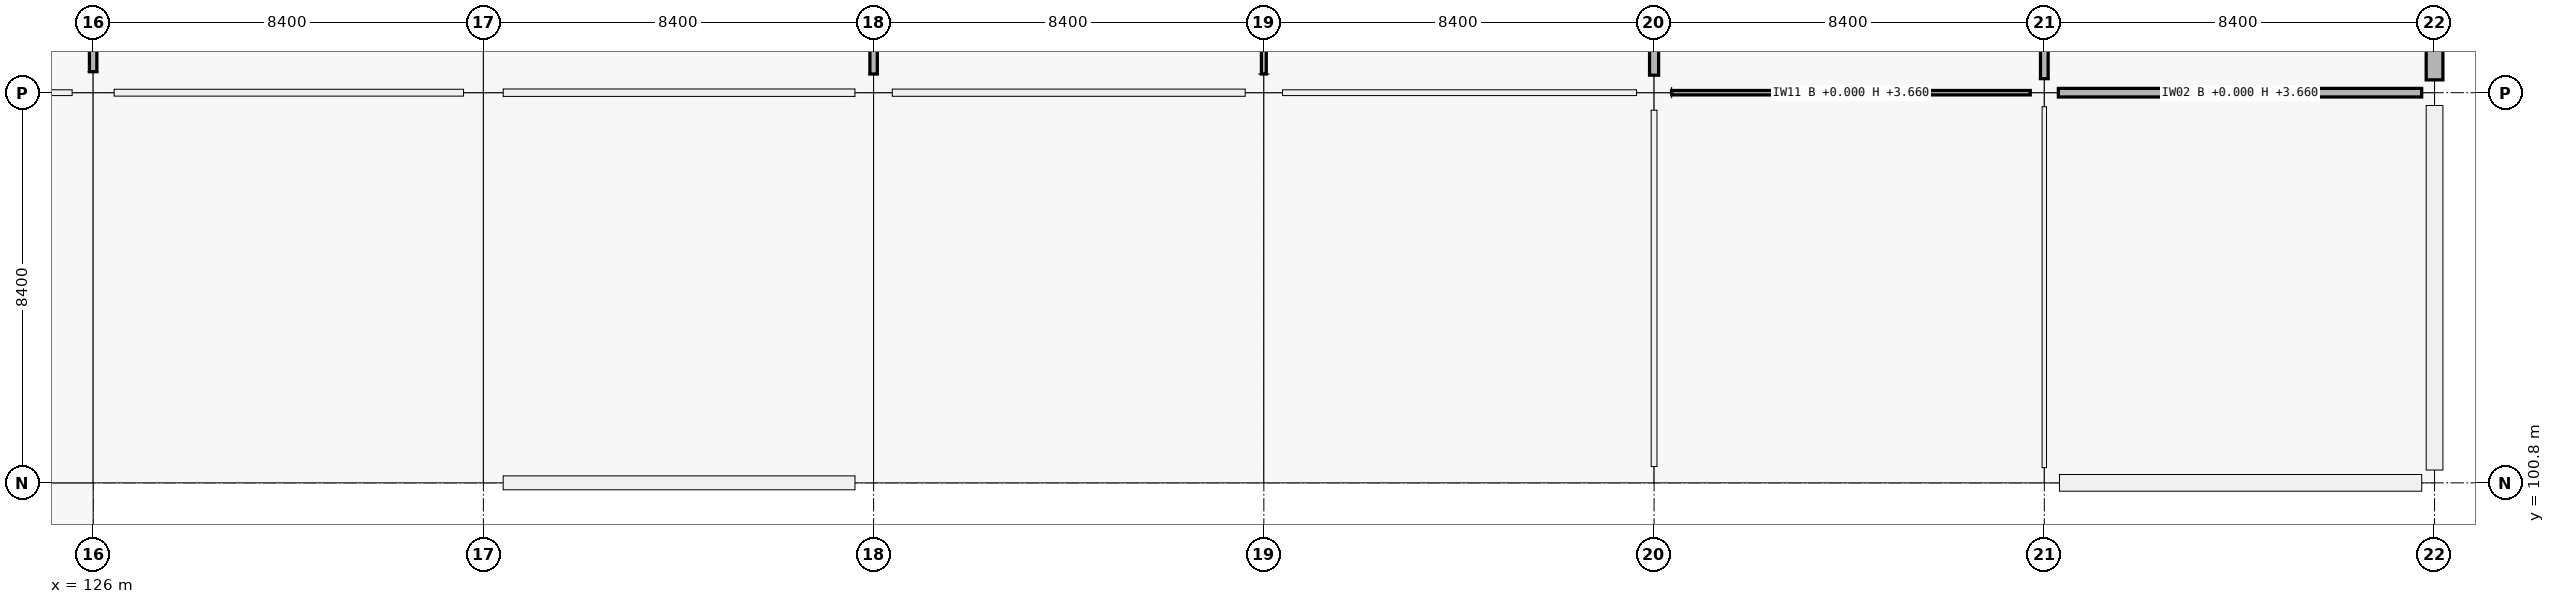
"""IFC4 building model, lengths in metres.
Left out: names, types, materials, properties, quantities, classifications, styles, units other than length and angle.
Written with IfcOpenShell. Run it as: python <this file> out.ifc"""

import sys

from ifc_helpers import new_model, si_unit, direction, frame, frame_2d, origin, origin_2d, place, context, subcontext, project, spatial, rectangle, extrude, element, fill, save


model = new_model("IFC4")
c1 = context("Model", 3, precision=1e-05, world=origin(), true_north=direction((0.0, 1.0)))
c2 = subcontext(c1, "Body", "Model", "MODEL_VIEW")
j1 = project(units=[si_unit("LENGTHUNIT", "METRE"), si_unit("PLANEANGLEUNIT", "RADIAN")], contexts=[c1])
p1 = place(None, origin())
s1 = spatial("IfcSite", under=j1, at=p1, CompositionType="ELEMENT")
p2 = place(p1, origin())
s2 = spatial("IfcBuilding", under=s1, at=p2, CompositionType="ELEMENT")
p3 = place(p2, origin())
s3 = spatial("IfcBuildingStorey", under=s2, at=p3, CompositionType="ELEMENT", Elevation=0.0)
for number, where, z_axis, x_axis in (
    (1, (126.0, 100.8, 0.0), (0.0, 0.0, 1.0), (1.0, 0.0, 0.0)),
    (2, (126.0, 109.2, 0.0), (0.0, 0.0, 1.0), (1.0, 0.0, 0.0)),
):
    element("IfcColumn", number, at=place(p3, frame(where, z_axis=z_axis, x_axis=x_axis)), inside=s3, PredefinedType="COLUMN", context=c2, shape_type="SweptSolid", body=[
        extrude(rectangle(XDim=0.9, YDim=0.9, at=origin_2d()), origin(), (0.0, 0.0, 1.0), 5.76),
    ])
for number, where, z_axis, x_axis in (
    (3, (134.4, 100.8, 0.0), (0.0, 0.0, 1.0), (1.0, 0.0, 0.0)),
    (4, (134.4, 109.2, 0.0), (0.0, 0.0, 1.0), (1.0, 0.0, 0.0)),
):
    element("IfcColumn", number, at=place(p3, frame(where, z_axis=z_axis, x_axis=x_axis)), inside=s3, PredefinedType="COLUMN", context=c2, shape_type="SweptSolid", body=[
        extrude(rectangle(XDim=0.85, YDim=0.85, at=origin_2d()), origin(), (0.0, 0.0, 1.0), 5.76),
    ])
for number, where, z_axis, x_axis in (
    (5, (142.8, 100.8, 0.0), (0.0, 0.0, 1.0), (1.0, 0.0, 0.0)),
    (6, (142.8, 109.2, 0.0), (0.0, 0.0, 1.0), (1.0, 0.0, 0.0)),
    (7, (151.2, 100.8, 0.0), (0.0, 0.0, 1.0), (1.0, 0.0, 0.0)),
    (8, (151.2, 109.2, 0.0), (0.0, 0.0, 1.0), (1.0, 0.0, 0.0)),
):
    element("IfcColumn", number, at=place(p3, frame(where, z_axis=z_axis, x_axis=x_axis)), inside=s3, PredefinedType="COLUMN", context=c2, shape_type="SweptSolid", body=[
        extrude(rectangle(XDim=0.8, YDim=0.8, at=origin_2d()), origin(), (0.0, 0.0, 1.0), 5.76),
    ])
p4 = place(p3, frame((159.6, 100.8, 0.0), z_axis=(0.0, 0.0, 1.0), x_axis=(1.0, 0.0, 0.0)))
e9 = element("IfcColumn", 9, at=p4, inside=s3, PredefinedType="COLUMN", context=c2, shape_type="SweptSolid", body=[
    extrude(rectangle(XDim=0.7, YDim=0.7, at=origin_2d()), origin(), (0.0, 0.0, 1.0), 5.76),
])
p5 = place(p3, frame((159.6, 109.2, 0.0), z_axis=(0.0, 0.0, 1.0), x_axis=(1.0, 0.0, 0.0)))
e10 = element("IfcColumn", 10, at=p5, inside=s3, PredefinedType="COLUMN", context=c2, shape_type="SweptSolid", body=[
    extrude(rectangle(XDim=0.75, YDim=0.75, at=origin_2d()), origin(), (0.0, 0.0, 1.0), 5.76),
])
p6 = place(p3, frame((168.0, 100.8, 0.0), z_axis=(0.0, 0.0, 1.0), x_axis=(1.0, 0.0, 0.0)))
e11 = element("IfcColumn", 11, at=p6, inside=s3, PredefinedType="COLUMN", context=c2, shape_type="SweptSolid", body=[
    extrude(rectangle(XDim=0.65, YDim=0.65, at=origin_2d()), origin(), (0.0, 0.0, 1.0), 5.76),
])
p7 = place(p3, frame((168.0, 109.2, 0.0), z_axis=(0.0, 0.0, 1.0), x_axis=(1.0, 0.0, 0.0)))
e12 = element("IfcColumn", 12, at=p7, inside=s3, PredefinedType="COLUMN", context=c2, shape_type="SweptSolid", body=[
    extrude(rectangle(XDim=0.6, YDim=0.6, at=origin_2d()), origin(), (0.0, 0.0, 1.0), 5.76),
])
for number, where, z_axis, x_axis in (
    (13, (176.4, 100.8, 0.0), (0.0, 0.0, 1.0), (1.0, 0.0, 0.0)),
    (14, (176.4, 109.2, 0.0), (0.0, 0.0, 1.0), (1.0, 0.0, 0.0)),
):
    element("IfcColumn", number, at=place(p3, frame(where, z_axis=z_axis, x_axis=x_axis)), inside=s3, PredefinedType="COLUMN", context=c2, shape_type="SweptSolid", body=[
        extrude(rectangle(XDim=0.55, YDim=0.55, at=origin_2d()), origin(), (0.0, 0.0, 1.0), 5.51),
    ])
p8 = place(p3, frame((142.399, 100.8, 0.0), z_axis=(0.0, 0.0, 1.0), x_axis=(-1.0, 0.0, 0.0)))
e15 = element("IfcWall", 15, at=p8, inside=s3, PredefinedType="SOLIDWALL", context=c2, shape_type="SweptSolid", body=[
    extrude(rectangle(XDim=7.573, YDim=0.3, at=frame_2d((3.787, 0.0))), origin(), (0.0, 0.0, 1.0), 4.7),
])
p9 = place(p8, frame((3.137, 0.0, 0.9)))
e16 = element("IfcOpeningElement", 16, at=p9, cuts=e15, PredefinedType="OPENING", context=c2, shape_type="SweptSolid", body=[
    extrude(rectangle(XDim=1.3, YDim=1.95, at=frame_2d((0.65, 0.975))), frame((0.0, 0.15, 0.0), z_axis=(0.0, -1.0, 0.0), x_axis=(1.0, 0.0, 0.0)), (0.0, 0.0, 1.0), 0.3),
])
p10 = place(p3, frame((176.124, 100.8, 0.0), z_axis=(0.0, 0.0, 1.0), x_axis=(-1.0, 0.0, 0.0)))
e17 = element("IfcWall", 17, at=p10, inside=s3, PredefinedType="SOLIDWALL", context=c2, shape_type="SweptSolid", body=[
    extrude(rectangle(XDim=7.798, YDim=0.36, at=frame_2d((3.899, 0.0))), origin(), (0.0, 0.0, 1.0), 4.7),
])
p11 = place(p10, frame((2.549, 0.0, 0.9)))
e18 = element("IfcOpeningElement", 18, at=p11, cuts=e17, PredefinedType="OPENING", context=c2, shape_type="SweptSolid", body=[
    extrude(rectangle(XDim=2.7, YDim=1.2, at=frame_2d((1.35, 0.6))), frame((0.0, 0.18, 0.0), z_axis=(0.0, -1.0, 0.0), x_axis=(1.0, 0.0, 0.0)), (0.0, 0.0, 1.0), 0.36),
])
p12 = place(p3, frame((176.4, 108.924, 0.0), z_axis=(0.0, 0.0, 1.0), x_axis=(0.0, -1.0, 0.0)))
e19 = element("IfcWall", 19, at=p12, inside=s3, PredefinedType="SOLIDWALL", context=c2, shape_type="SweptSolid", body=[
    extrude(rectangle(XDim=7.848, YDim=0.36, at=frame_2d((3.924, 0.0))), origin(), (0.0, 0.0, 1.0), 4.7),
])
p13 = place(p12, frame((2.824, 0.0, 0.9)))
e20 = element("IfcOpeningElement", 20, at=p13, cuts=e19, PredefinedType="OPENING", context=c2, shape_type="SweptSolid", body=[
    extrude(rectangle(XDim=2.2, YDim=1.35, at=frame_2d((1.1, 0.675))), frame((0.0, 0.18, 0.0), z_axis=(0.0, -1.0, 0.0), x_axis=(1.0, 0.0, 0.0)), (0.0, 0.0, 1.0), 0.36),
])
p14 = place(p3, frame((176.4, 117.324, 0.0), z_axis=(0.0, 0.0, 1.0), x_axis=(0.0, -1.0, 0.0)))
e21 = element("IfcWall", 21, at=p14, inside=s3, PredefinedType="SOLIDWALL", context=c2, shape_type="SweptSolid", body=[
    extrude(rectangle(XDim=7.848, YDim=0.36, at=frame_2d((3.924, 0.0))), origin(), (0.0, 0.0, 1.0), 4.7),
])
p15 = place(p14, frame((2.824, 0.0, 0.9)))
e22 = element("IfcOpeningElement", 22, at=p15, cuts=e21, PredefinedType="OPENING", context=c2, shape_type="SweptSolid", body=[
    extrude(rectangle(XDim=2.2, YDim=1.75, at=frame_2d((1.1, 0.875))), frame((0.0, 0.18, 0.0), z_axis=(0.0, -1.0, 0.0), x_axis=(1.0, 0.0, 0.0)), (0.0, 0.0, 1.0), 0.36),
])
p16 = place(p3, frame((118.052, 109.2, 0.0), z_axis=(0.0, 0.0, 1.0), x_axis=(1.0, 0.0, 0.0)))
e23 = element("IfcWall", 23, at=p16, inside=s3, PredefinedType="PARTITIONING", context=c2, shape_type="SweptSolid", body=[
    extrude(rectangle(XDim=7.496, YDim=0.125, at=frame_2d((3.748, 0.0))), origin(), (0.0, 0.0, 1.0), 3.66),
])
p17 = place(p16, frame((3.288, 0.0, 0.0)))
e24 = element("IfcOpeningElement", 24, at=p17, cuts=e23, PredefinedType="OPENING", context=c2, shape_type="SweptSolid", body=[
    extrude(rectangle(XDim=0.92, YDim=2.15, at=frame_2d((0.46, 1.075))), frame((0.0, 0.062, 0.0), z_axis=(0.0, -1.0, 0.0), x_axis=(1.0, 0.0, 0.0)), (0.0, 0.0, 1.0), 0.125),
])
p18 = place(p3, frame((126.452, 109.2, 0.0), z_axis=(0.0, 0.0, 1.0), x_axis=(1.0, 0.0, 0.0)))
e25 = element("IfcWall", 25, at=p18, inside=s3, PredefinedType="PARTITIONING", context=c2, shape_type="SweptSolid", body=[
    extrude(rectangle(XDim=7.521, YDim=0.148, at=frame_2d((3.76, 0.0))), origin(), (0.0, 0.0, 1.0), 3.66),
])
p19 = place(p18, frame((3.236, 0.0, 0.0)))
e26 = element("IfcOpeningElement", 26, at=p19, cuts=e25, PredefinedType="OPENING", context=c2, shape_type="SweptSolid", body=[
    extrude(rectangle(XDim=1.05, YDim=2.15, at=frame_2d((0.525, 1.075))), frame((0.0, 0.074, 0.0), z_axis=(0.0, -1.0, 0.0), x_axis=(1.0, 0.0, 0.0)), (0.0, 0.0, 1.0), 0.148),
])
p20 = place(p3, frame((134.827, 109.2, 0.0), z_axis=(0.0, 0.0, 1.0), x_axis=(1.0, 0.0, 0.0)))
e27 = element("IfcWall", 27, at=p20, inside=s3, PredefinedType="PARTITIONING", context=c2, shape_type="SweptSolid", body=[
    extrude(rectangle(XDim=7.571, YDim=0.16, at=frame_2d((3.786, 0.0))), origin(), (0.0, 0.0, 1.0), 3.66),
])
p21 = place(p20, frame((3.285, 0.0, 0.0)))
e28 = element("IfcOpeningElement", 28, at=p21, cuts=e27, PredefinedType="OPENING", context=c2, shape_type="SweptSolid", body=[
    extrude(rectangle(XDim=1.0, YDim=2.15, at=frame_2d((0.5, 1.075))), frame((0.0, 0.08, 0.0), z_axis=(0.0, -1.0, 0.0), x_axis=(1.0, 0.0, 0.0)), (0.0, 0.0, 1.0), 0.16),
])
p22 = place(p3, frame((143.202, 109.2, 0.0), z_axis=(0.0, 0.0, 1.0), x_axis=(1.0, 0.0, 0.0)))
e29 = element("IfcWall", 29, at=p22, inside=s3, PredefinedType="PARTITIONING", context=c2, shape_type="SweptSolid", body=[
    extrude(rectangle(XDim=7.596, YDim=0.155, at=frame_2d((3.798, 0.0))), origin(), (0.0, 0.0, 1.0), 3.66),
])
p23 = place(p22, frame((3.333, 0.0, 0.0)))
e30 = element("IfcOpeningElement", 30, at=p23, cuts=e29, PredefinedType="OPENING", context=c2, shape_type="SweptSolid", body=[
    extrude(rectangle(XDim=0.93, YDim=2.12, at=frame_2d((0.465, 1.06))), frame((0.0, 0.078, 0.0), z_axis=(0.0, -1.0, 0.0), x_axis=(1.0, 0.0, 0.0)), (0.0, 0.0, 1.0), 0.155),
])
p24 = place(p3, frame((151.602, 109.2, 0.0), z_axis=(0.0, 0.0, 1.0), x_axis=(1.0, 0.0, 0.0)))
e31 = element("IfcWall", 31, at=p24, inside=s3, PredefinedType="PARTITIONING", context=c2, shape_type="SweptSolid", body=[
    extrude(rectangle(XDim=7.621, YDim=0.125, at=frame_2d((3.811, 0.0))), origin(), (0.0, 0.0, 1.0), 3.66),
])
p25 = place(p24, frame((3.271, 0.0, 0.0)))
e32 = element("IfcOpeningElement", 32, at=p25, cuts=e31, PredefinedType="OPENING", context=c2, shape_type="SweptSolid", body=[
    extrude(rectangle(XDim=1.08, YDim=2.25, at=frame_2d((0.54, 1.125))), frame((0.0, 0.062, 0.0), z_axis=(0.0, -1.0, 0.0), x_axis=(1.0, 0.0, 0.0)), (0.0, 0.0, 1.0), 0.125),
])
p26 = place(p3, frame((159.977, 109.2, 0.0), z_axis=(0.0, 0.0, 1.0), x_axis=(1.0, 0.0, 0.0)))
e33 = element("IfcWall", 33, at=p26, inside=s3, PredefinedType="PARTITIONING", context=c2, shape_type="SweptSolid", body=[
    extrude(rectangle(XDim=7.721, YDim=0.095, at=frame_2d((3.86, 0.0))), origin(), (0.0, 0.0, 1.0), 3.66),
])
p27 = place(p26, frame((3.356, 0.0, 0.0)))
e34 = element("IfcOpeningElement", 34, at=p27, cuts=e33, PredefinedType="OPENING", context=c2, shape_type="SweptSolid", body=[
    extrude(rectangle(XDim=1.01, YDim=2.12, at=frame_2d((0.505, 1.06))), frame((0.0, 0.047, 0.0), z_axis=(0.0, -1.0, 0.0), x_axis=(1.0, 0.0, 0.0)), (0.0, 0.0, 1.0), 0.095),
])
p28 = place(p3, frame((168.302, 109.2, 0.0), z_axis=(0.0, 0.0, 1.0), x_axis=(1.0, 0.0, 0.0)))
e35 = element("IfcWall", 35, at=p28, inside=s3, PredefinedType="PARTITIONING", context=c2, shape_type="SweptSolid", body=[
    extrude(rectangle(XDim=7.821, YDim=0.185, at=frame_2d((3.911, 0.0))), origin(), (0.0, 0.0, 1.0), 3.66),
])
p29 = place(p28, frame((3.401, 0.0, 0.0)))
e36 = element("IfcOpeningElement", 36, at=p29, cuts=e35, PredefinedType="OPENING", context=c2, shape_type="SweptSolid", body=[
    extrude(rectangle(XDim=1.02, YDim=2.2, at=frame_2d((0.51, 1.1))), frame((0.0, 0.093, 0.0), z_axis=(0.0, -1.0, 0.0), x_axis=(1.0, 0.0, 0.0)), (0.0, 0.0, 1.0), 0.185),
])
p30 = place(p3, frame((126.0, 109.652, 0.0), z_axis=(0.0, 0.0, 1.0), x_axis=(0.0, 1.0, 0.0)))
e37 = element("IfcWall", 37, at=p30, inside=s3, PredefinedType="PARTITIONING", context=c2, shape_type="SweptSolid", body=[
    extrude(rectangle(XDim=7.496, YDim=0.16, at=frame_2d((3.748, 0.0))), origin(), (0.0, 0.0, 1.0), 3.66),
])
p31 = place(p30, frame((3.173, 0.0, 0.0)))
e38 = element("IfcOpeningElement", 38, at=p31, cuts=e37, PredefinedType="OPENING", context=c2, shape_type="SweptSolid", body=[
    extrude(rectangle(XDim=1.15, YDim=2.2, at=frame_2d((0.575, 1.1))), frame((0.0, 0.08, 0.0), z_axis=(0.0, -1.0, 0.0), x_axis=(1.0, 0.0, 0.0)), (0.0, 0.0, 1.0), 0.16),
])
p32 = place(p3, frame((142.8, 109.602, 0.0), z_axis=(0.0, 0.0, 1.0), x_axis=(0.0, 1.0, 0.0)))
e39 = element("IfcWall", 39, at=p32, inside=s3, PredefinedType="PARTITIONING", context=c2, shape_type="SweptSolid", body=[
    extrude(rectangle(XDim=7.721, YDim=0.16, at=frame_2d((3.86, 0.0))), origin(), (0.0, 0.0, 1.0), 3.66),
])
p33 = place(p32, frame((3.311, 0.0, 0.0)))
e40 = element("IfcOpeningElement", 40, at=p33, cuts=e39, PredefinedType="OPENING", context=c2, shape_type="SweptSolid", body=[
    extrude(rectangle(XDim=1.1, YDim=2.15, at=frame_2d((0.55, 1.075))), frame((0.0, 0.08, 0.0), z_axis=(0.0, -1.0, 0.0), x_axis=(1.0, 0.0, 0.0)), (0.0, 0.0, 1.0), 0.16),
])
p34 = place(p3, frame((151.2, 109.602, 0.0), z_axis=(0.0, 0.0, 1.0), x_axis=(0.0, 1.0, 0.0)))
e41 = element("IfcWall", 41, at=p34, inside=s3, PredefinedType="PARTITIONING", context=c2, shape_type="SweptSolid", body=[
    extrude(rectangle(XDim=7.721, YDim=0.105, at=frame_2d((3.86, 0.0))), origin(), (0.0, 0.0, 1.0), 3.66),
])
p35 = place(p34, frame((3.401, 0.0, 0.0)))
e42 = element("IfcOpeningElement", 42, at=p35, cuts=e41, PredefinedType="OPENING", context=c2, shape_type="SweptSolid", body=[
    extrude(rectangle(XDim=0.92, YDim=2.15, at=frame_2d((0.46, 1.075))), frame((0.0, 0.052, 0.0), z_axis=(0.0, -1.0, 0.0), x_axis=(1.0, 0.0, 0.0)), (0.0, 0.0, 1.0), 0.105),
])
p36 = place(p3, frame((159.6, 101.152, 0.0), z_axis=(0.0, 0.0, 1.0), x_axis=(0.0, 1.0, 0.0)))
e43 = element("IfcWall", 43, at=p36, inside=s3, PredefinedType="PARTITIONING", context=c2, shape_type="SweptSolid", body=[
    extrude(rectangle(XDim=7.671, YDim=0.125, at=frame_2d((3.835, 0.0))), origin(), (0.0, 0.0, 1.0), 3.66),
])
p37 = place(p36, frame((3.311, 0.0, 0.0)))
e44 = element("IfcOpeningElement", 44, at=p37, cuts=e43, PredefinedType="OPENING", context=c2, shape_type="SweptSolid", body=[
    extrude(rectangle(XDim=1.05, YDim=2.12, at=frame_2d((0.525, 1.06))), frame((0.0, 0.062, 0.0), z_axis=(0.0, -1.0, 0.0), x_axis=(1.0, 0.0, 0.0)), (0.0, 0.0, 1.0), 0.125),
])
p38 = place(p3, frame((159.6, 109.577, 0.0), z_axis=(0.0, 0.0, 1.0), x_axis=(0.0, 1.0, 0.0)))
e45 = element("IfcWall", 45, at=p38, inside=s3, PredefinedType="PARTITIONING", context=c2, shape_type="SweptSolid", body=[
    extrude(rectangle(XDim=7.671, YDim=0.195, at=frame_2d((3.835, 0.0))), origin(), (0.0, 0.0, 1.0), 3.66),
])
p39 = place(p38, frame((3.351, 0.0, 0.0)))
e46 = element("IfcOpeningElement", 46, at=p39, cuts=e45, PredefinedType="OPENING", context=c2, shape_type="SweptSolid", body=[
    extrude(rectangle(XDim=0.97, YDim=2.12, at=frame_2d((0.485, 1.06))), frame((0.0, 0.098, 0.0), z_axis=(0.0, -1.0, 0.0), x_axis=(1.0, 0.0, 0.0)), (0.0, 0.0, 1.0), 0.195),
])
p40 = place(p3, frame((168.0, 101.127, 0.0), z_axis=(0.0, 0.0, 1.0), x_axis=(0.0, 1.0, 0.0)))
e47 = element("IfcWall", 47, at=p40, inside=s3, PredefinedType="PARTITIONING", context=c2, shape_type="SweptSolid", body=[
    extrude(rectangle(XDim=7.771, YDim=0.095, at=frame_2d((3.885, 0.0))), origin(), (0.0, 0.0, 1.0), 3.66),
])
p41 = place(p40, frame((3.385, 0.0, 0.0)))
e48 = element("IfcOpeningElement", 48, at=p41, cuts=e47, PredefinedType="OPENING", context=c2, shape_type="SweptSolid", body=[
    extrude(rectangle(XDim=1.0, YDim=2.2, at=frame_2d((0.5, 1.1))), frame((0.0, 0.047, 0.0), z_axis=(0.0, -1.0, 0.0), x_axis=(1.0, 0.0, 0.0)), (0.0, 0.0, 1.0), 0.095),
])
p42 = place(p3, frame((168.0, 109.502, 0.0), z_axis=(0.0, 0.0, 1.0), x_axis=(0.0, 1.0, 0.0)))
e49 = element("IfcWall", 49, at=p42, inside=s3, PredefinedType="PARTITIONING", context=c2, shape_type="SweptSolid", body=[
    extrude(rectangle(XDim=7.771, YDim=0.165, at=frame_2d((3.885, 0.0))), origin(), (0.0, 0.0, 1.0), 3.66),
])
p43 = place(p42, frame((3.365, 0.0, 0.0)))
e50 = element("IfcOpeningElement", 50, at=p43, cuts=e49, PredefinedType="OPENING", context=c2, shape_type="SweptSolid", body=[
    extrude(rectangle(XDim=1.04, YDim=2.2, at=frame_2d((0.52, 1.1))), frame((0.0, 0.083, 0.0), z_axis=(0.0, -1.0, 0.0), x_axis=(1.0, 0.0, 0.0)), (0.0, 0.0, 1.0), 0.165),
])
p44 = place(p9, origin())
e51 = element("IfcWindow", 51, at=p44, inside=s3, PartitioningType="SINGLE_PANEL", PredefinedType="WINDOW", context=c2, shape_type="SweptSolid", body=[
    extrude(rectangle(XDim=1.3, YDim=1.95, at=frame_2d((0.65, 0.975))), frame((0.0, 0.03, 0.0), z_axis=(0.0, -1.0, 0.0), x_axis=(1.0, 0.0, 0.0)), (0.0, 0.0, 1.0), 0.06),
])
fill(e16, e51)
p45 = place(p11, origin())
e52 = element("IfcWindow", 52, at=p45, inside=s3, PartitioningType="SINGLE_PANEL", PredefinedType="WINDOW", context=c2, shape_type="SweptSolid", body=[
    extrude(rectangle(XDim=2.7, YDim=1.2, at=frame_2d((1.35, 0.6))), frame((0.0, 0.03, 0.0), z_axis=(0.0, -1.0, 0.0), x_axis=(1.0, 0.0, 0.0)), (0.0, 0.0, 1.0), 0.06),
])
fill(e18, e52)
p46 = place(p13, origin())
e53 = element("IfcWindow", 53, at=p46, inside=s3, PartitioningType="SINGLE_PANEL", PredefinedType="WINDOW", context=c2, shape_type="SweptSolid", body=[
    extrude(rectangle(XDim=2.2, YDim=1.35, at=frame_2d((1.1, 0.675))), frame((0.0, 0.03, 0.0), z_axis=(0.0, -1.0, 0.0), x_axis=(1.0, 0.0, 0.0)), (0.0, 0.0, 1.0), 0.06),
])
fill(e20, e53)
p47 = place(p19, origin())
e54 = element("IfcDoor", 54, at=p47, inside=s3, OperationType="SINGLE_SWING_RIGHT", PredefinedType="DOOR", context=c2, shape_type="SweptSolid", body=[
    extrude(rectangle(XDim=1.05, YDim=2.15, at=frame_2d((0.525, 1.075))), frame((0.0, 0.025, 0.0), z_axis=(0.0, -1.0, 0.0), x_axis=(1.0, 0.0, 0.0)), (0.0, 0.0, 1.0), 0.05),
])
fill(e26, e54)
p48 = place(p21, origin())
e55 = element("IfcDoor", 55, at=p48, inside=s3, OperationType="SINGLE_SWING_RIGHT", PredefinedType="DOOR", context=c2, shape_type="SweptSolid", body=[
    extrude(rectangle(XDim=1.0, YDim=2.15, at=frame_2d((0.5, 1.075))), frame((0.0, 0.025, 0.0), z_axis=(0.0, -1.0, 0.0), x_axis=(1.0, 0.0, 0.0)), (0.0, 0.0, 1.0), 0.05),
])
fill(e28, e55)
p49 = place(p23, origin())
e56 = element("IfcDoor", 56, at=p49, inside=s3, OperationType="SINGLE_SWING_LEFT", PredefinedType="DOOR", context=c2, shape_type="SweptSolid", body=[
    extrude(rectangle(XDim=0.93, YDim=2.12, at=frame_2d((0.465, 1.06))), frame((0.0, 0.025, 0.0), z_axis=(0.0, -1.0, 0.0), x_axis=(1.0, 0.0, 0.0)), (0.0, 0.0, 1.0), 0.05),
])
fill(e30, e56)
p50 = place(p25, origin())
e57 = element("IfcDoor", 57, at=p50, inside=s3, OperationType="SINGLE_SWING_RIGHT", PredefinedType="DOOR", context=c2, shape_type="SweptSolid", body=[
    extrude(rectangle(XDim=1.08, YDim=2.25, at=frame_2d((0.54, 1.125))), frame((0.0, 0.025, 0.0), z_axis=(0.0, -1.0, 0.0), x_axis=(1.0, 0.0, 0.0)), (0.0, 0.0, 1.0), 0.05),
])
fill(e32, e57)
p51 = place(p37, origin())
e58 = element("IfcDoor", 58, at=p51, inside=s3, OperationType="SINGLE_SWING_RIGHT", PredefinedType="DOOR", context=c2, shape_type="SweptSolid", body=[
    extrude(rectangle(XDim=1.05, YDim=2.12, at=frame_2d((0.525, 1.06))), frame((0.0, 0.025, 0.0), z_axis=(0.0, -1.0, 0.0), x_axis=(1.0, 0.0, 0.0)), (0.0, 0.0, 1.0), 0.05),
])
fill(e44, e58)
p52 = place(p27, origin())
e59 = element("IfcDoor", 59, at=p52, inside=s3, OperationType="SINGLE_SWING_LEFT", PredefinedType="DOOR", context=c2, shape_type="SweptSolid", body=[
    extrude(rectangle(XDim=1.01, YDim=2.12, at=frame_2d((0.505, 1.06))), frame((0.0, 0.025, 0.0), z_axis=(0.0, -1.0, 0.0), x_axis=(1.0, 0.0, 0.0)), (0.0, 0.0, 1.0), 0.05),
])
fill(e34, e59)
p53 = place(p29, origin())
e60 = element("IfcDoor", 60, at=p53, inside=s3, OperationType="SINGLE_SWING_LEFT", PredefinedType="DOOR", context=c2, shape_type="SweptSolid", body=[
    extrude(rectangle(XDim=1.02, YDim=2.2, at=frame_2d((0.51, 1.1))), frame((0.0, 0.025, 0.0), z_axis=(0.0, -1.0, 0.0), x_axis=(1.0, 0.0, 0.0)), (0.0, 0.0, 1.0), 0.05),
])
fill(e36, e60)
p54 = place(p41, origin())
e61 = element("IfcDoor", 61, at=p54, inside=s3, OperationType="SINGLE_SWING_RIGHT", PredefinedType="DOOR", context=c2, shape_type="SweptSolid", body=[
    extrude(rectangle(XDim=1.0, YDim=2.2, at=frame_2d((0.5, 1.1))), frame((0.0, 0.025, 0.0), z_axis=(0.0, -1.0, 0.0), x_axis=(1.0, 0.0, 0.0)), (0.0, 0.0, 1.0), 0.05),
])
fill(e48, e61)
save(model, sys.argv[1])
